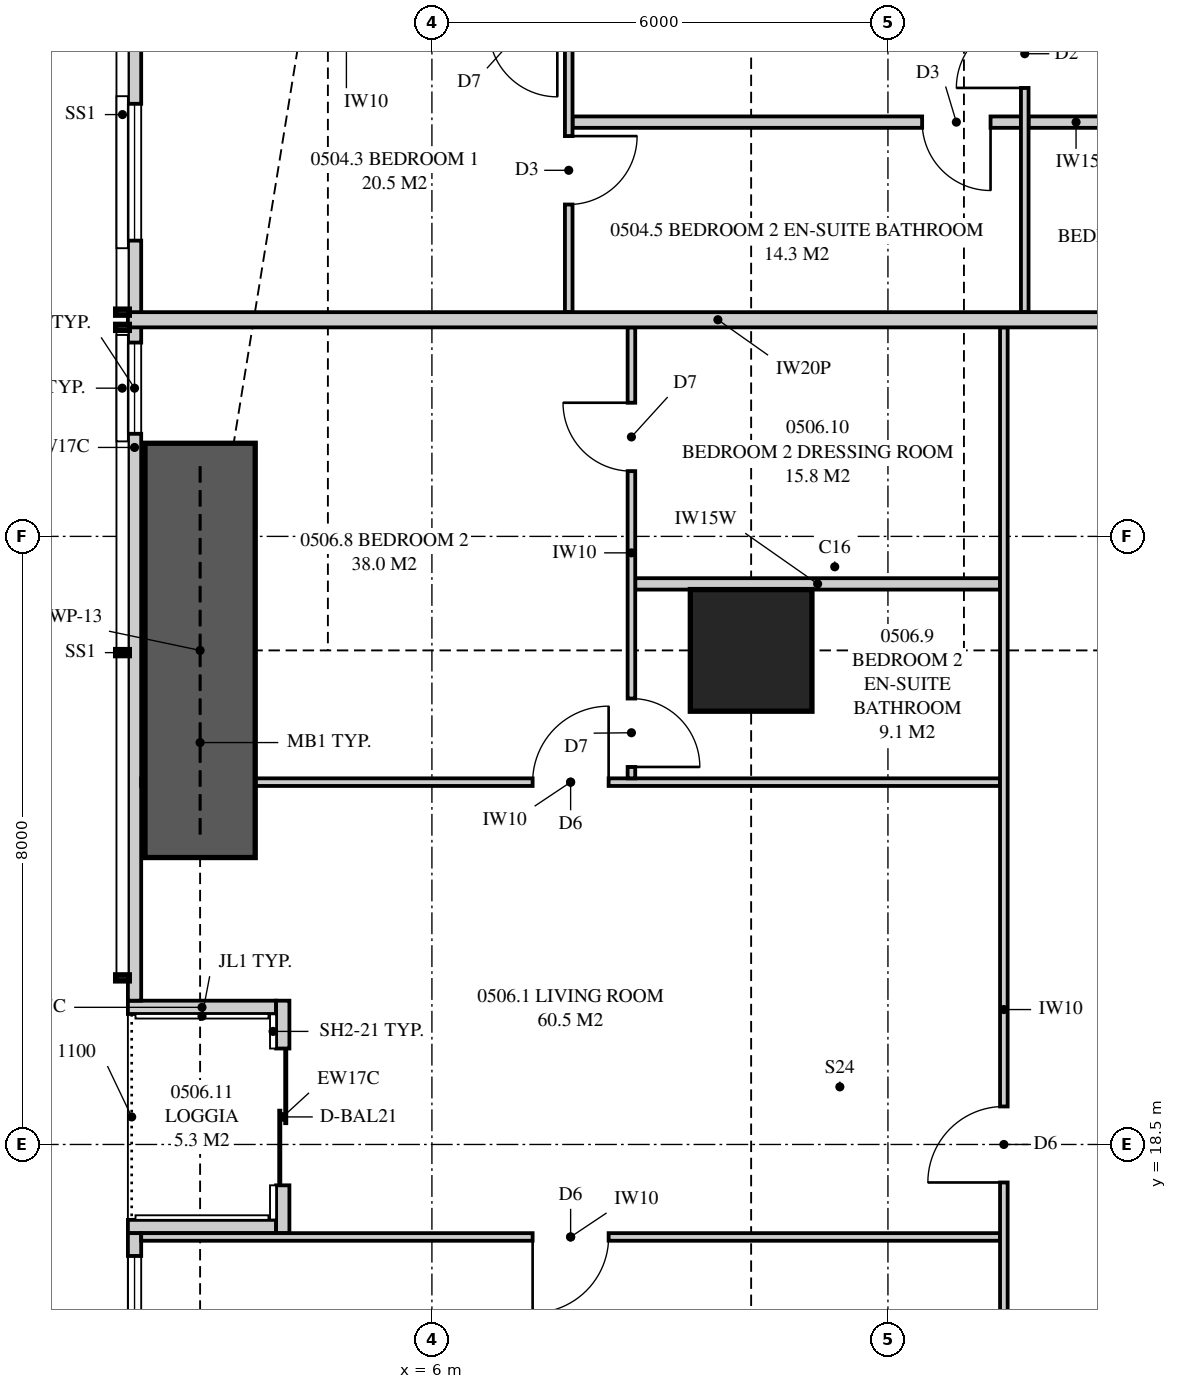
"""IFC4 building model, lengths in metres.
Left out: names, types, materials, properties, quantities, classifications, styles, units other than length and angle.
Written with IfcOpenShell. Run it as: python <this file> out.ifc"""

import sys

from ifc_helpers import new_model, si_unit, direction, frame, frame_2d, origin, origin_2d, place, context, subcontext, project, spatial, polyline, rectangle, outline, extrude, element, fill, save


model = new_model("IFC4")
c1 = context("Model", 3, precision=1e-05, world=origin(), true_north=direction((0.0, 1.0)))
c2 = subcontext(c1, "Body", "Model", "MODEL_VIEW")
j1 = project(units=[si_unit("LENGTHUNIT", "METRE"), si_unit("PLANEANGLEUNIT", "RADIAN")], contexts=[c1])
p1 = place(None, origin())
s1 = spatial("IfcSite", under=j1, at=p1, CompositionType="ELEMENT")
p2 = place(p1, origin())
s2 = spatial("IfcBuilding", under=s1, at=p2, CompositionType="ELEMENT")
p3 = place(p2, frame((0.0, 0.0, 24.35)))
s3 = spatial("IfcBuildingStorey", under=s2, at=p3, CompositionType="ELEMENT", Elevation=24.35)
p4 = place(p3, frame((10.2, 25.0, 0.0), z_axis=(0.0, 0.0, 1.0), x_axis=(1.0, 0.0, 0.0)))
e1 = element("IfcColumn", 1, at=p4, inside=s3, PredefinedType="COLUMN", context=c2, shape_type="SweptSolid", body=[
    extrude(rectangle(XDim=1.6, YDim=1.6, at=origin_2d()), origin(), (0.0, 0.0, 1.0), 3.35),
])
p5 = place(p3, frame((2.087, 34.949, 0.0), z_axis=(0.0, 0.0, 1.0), x_axis=(0.0, -1.0, 0.0)))
e2 = element("IfcWall", 2, at=p5, inside=s3, PredefinedType="SOLIDWALL", context=c2, shape_type="SweptSolid", body=[
    extrude(outline(polyline([(0.0, 0.0), (14.557, 0.0), (14.557, 2.15), (9.949, 2.15), (9.949, 3.11), (9.823, 3.11), (9.823, 2.15), (9.73, 2.15), (9.73, 3.11), (0.0, 3.11), (0.0, 0.0)])), frame((0.0, 0.087, 0.0), z_axis=(0.0, -1.0, 0.0), x_axis=(1.0, 0.0, 0.0)), (0.0, 0.0, 1.0), 0.175),
])
p6 = place(p5, frame((2.757, 0.0, 0.4)))
e3 = element("IfcOpeningElement", 3, at=p6, cuts=e2, PredefinedType="OPENING", context=c2, shape_type="SweptSolid", body=[
    extrude(rectangle(XDim=1.8, YDim=1.7, at=frame_2d((0.9, 0.85))), frame((0.0, 0.097, 0.0), z_axis=(0.0, -1.0, 0.0), x_axis=(1.0, 0.0, 0.0)), (0.0, 0.0, 1.0), 0.195),
])
p7 = place(p5, frame((5.899, 0.0, 0.4)))
e4 = element("IfcOpeningElement", 4, at=p7, cuts=e2, PredefinedType="OPENING", context=c2, shape_type="SweptSolid", body=[
    extrude(rectangle(XDim=1.2, YDim=1.7, at=frame_2d((0.6, 0.85))), frame((0.0, 0.097, 0.0), z_axis=(0.0, -1.0, 0.0), x_axis=(1.0, 0.0, 0.0)), (0.0, 0.0, 1.0), 0.195),
])
p8 = place(p3, frame((2.087, 17.333, 0.0), z_axis=(0.0, 0.0, 1.0), x_axis=(0.0, -1.0, 0.0)))
e5 = element("IfcWall", 5, at=p8, inside=s3, PredefinedType="SOLIDWALL", context=c2, shape_type="SweptSolid", body=[
    extrude(outline(polyline([(0.0, 0.0), (14.282, 0.0), (14.282, 3.11), (4.552, 3.11), (4.552, 2.15), (4.459, 2.15), (4.459, 3.11), (4.333, 3.11), (4.333, 2.15), (0.0, 2.15), (0.0, 0.0)])), frame((0.0, 0.087, 0.0), z_axis=(0.0, -1.0, 0.0), x_axis=(1.0, 0.0, 0.0)), (0.0, 0.0, 1.0), 0.175),
])
p9 = place(p8, frame((0.3, 0.0, 0.4)))
e6 = element("IfcOpeningElement", 6, at=p9, cuts=e5, PredefinedType="OPENING", context=c2, shape_type="SweptSolid", body=[
    extrude(rectangle(XDim=1.2, YDim=1.7, at=frame_2d((0.6, 0.85))), frame((0.0, 0.097, 0.0), z_axis=(0.0, -1.0, 0.0), x_axis=(1.0, 0.0, 0.0)), (0.0, 0.0, 1.0), 0.195),
])
p10 = place(p8, frame((7.158, 0.0, 0.4)))
e7 = element("IfcOpeningElement", 7, at=p10, cuts=e5, PredefinedType="OPENING", context=c2, shape_type="SweptSolid", body=[
    extrude(rectangle(XDim=1.8, YDim=1.7, at=frame_2d((0.9, 0.85))), frame((0.0, 0.097, 0.0), z_axis=(0.0, -1.0, 0.0), x_axis=(1.0, 0.0, 0.0)), (0.0, 0.0, 1.0), 0.195),
])
p11 = place(p8, frame((10.225, 0.0, 0.4)))
e8 = element("IfcOpeningElement", 8, at=p11, cuts=e5, PredefinedType="OPENING", context=c2, shape_type="SweptSolid", body=[
    extrude(rectangle(XDim=1.8, YDim=1.7, at=frame_2d((0.9, 0.85))), frame((0.0, 0.097, 0.0), z_axis=(0.0, -1.0, 0.0), x_axis=(1.0, 0.0, 0.0)), (0.0, 0.0, 1.0), 0.195),
])
p12 = place(p3, frame((4.038, 20.392, 0.0), z_axis=(0.0, 0.0, 1.0), x_axis=(0.0, -1.0, 0.0)))
e9 = element("IfcWall", 9, at=p12, inside=s3, PredefinedType="SOLIDWALL", context=c2, shape_type="SweptSolid", body=[
    extrude(rectangle(XDim=3.058, YDim=0.175, at=frame_2d((1.529, 0.0))), origin(), (0.0, 0.0, 1.0), 3.11),
])
p13 = place(p12, frame((0.629, 0.0, 0.0)))
e10 = element("IfcOpeningElement", 10, at=p13, cuts=e9, PredefinedType="OPENING", context=c2, shape_type="SweptSolid", body=[
    extrude(rectangle(XDim=1.8, YDim=2.1, at=frame_2d((0.9, 1.05))), frame((0.0, 0.097, 0.0), z_axis=(0.0, -1.0, 0.0), x_axis=(1.0, 0.0, 0.0)), (0.0, 0.0, 1.0), 0.195),
])
for number, where, z_axis, x_axis in (
    (11, (2.0, 20.304, 0.0), (0.0, 0.0, 1.0), (1.0, 0.0, 0.0)),
    (12, (2.0, 17.421, 0.0), (0.0, 0.0, 1.0), (1.0, 0.0, 0.0)),
):
    element("IfcWall", number, at=place(p3, frame(where, z_axis=z_axis, x_axis=x_axis)), inside=s3, PredefinedType="SOLIDWALL", context=c2, shape_type="SweptSolid", body=[
        extrude(outline(polyline([(0.0, 0.0), (1.95, 0.0), (1.95, 3.11), (1.75, 3.11), (1.75, 2.15), (0.15, 2.15), (0.15, 3.11), (0.0, 3.11), (0.0, 0.0)])), frame((0.0, 0.087, 0.0), z_axis=(0.0, -1.0, 0.0), x_axis=(1.0, 0.0, 0.0)), (0.0, 0.0, 1.0), 0.175),
    ])
p14 = place(p3, frame((7.8, 37.825, 0.0), z_axis=(0.0, 0.0, 1.0), x_axis=(0.0, -1.0, 0.0)))
e13 = element("IfcWall", 13, at=p14, inside=s3, PredefinedType="PARTITIONING", context=c2, shape_type="SweptSolid", body=[
    extrude(outline(polyline([(0.0, 0.0), (8.375, 0.0), (8.375, 3.11), (2.697, 3.11), (2.697, 2.15), (0.943, 2.15), (0.943, 3.11), (0.0, 3.11), (0.0, 0.0)])), frame((0.0, 0.05, 0.0), z_axis=(0.0, -1.0, 0.0), x_axis=(1.0, 0.0, 0.0)), (0.0, 0.0, 1.0), 0.1),
])
p15 = place(p14, frame((2.842, 0.0, 0.0)))
e14 = element("IfcOpeningElement", 14, at=p15, cuts=e13, PredefinedType="OPENING", context=c2, shape_type="SweptSolid", body=[
    extrude(rectangle(XDim=0.9, YDim=2.1, at=frame_2d((0.45, 1.05))), frame((0.0, 0.06, 0.0), z_axis=(0.0, -1.0, 0.0), x_axis=(1.0, 0.0, 0.0)), (0.0, 0.0, 1.0), 0.12),
])
p16 = place(p14, frame((6.059, 0.0, 0.0)))
e15 = element("IfcOpeningElement", 15, at=p16, cuts=e13, PredefinedType="OPENING", context=c2, shape_type="SweptSolid", body=[
    extrude(rectangle(XDim=0.9, YDim=2.1, at=frame_2d((0.45, 1.05))), frame((0.0, 0.06, 0.0), z_axis=(0.0, -1.0, 0.0), x_axis=(1.0, 0.0, 0.0)), (0.0, 0.0, 1.0), 0.12),
])
p17 = place(p3, frame((13.8, 37.825, 0.0), z_axis=(0.0, 0.0, 1.0), x_axis=(0.0, -1.0, 0.0)))
e16 = element("IfcWall", 16, at=p17, inside=s3, PredefinedType="PARTITIONING", context=c2, shape_type="SweptSolid", body=[
    extrude(outline(polyline([(1.635, 2.15), (0.0, 2.15), (0.0, 0.0), (8.375, 0.0), (8.375, 3.11), (1.635, 3.11), (1.635, 2.15)]), holes=[polyline([(1.021, 0.126), (0.529, 0.126), (0.529, 0.919), (1.021, 0.919), (1.021, 0.126)]), polyline([(1.021, 1.231), (0.529, 1.231), (0.529, 2.024), (1.021, 2.024), (1.021, 1.231)])]), frame((0.0, 0.05, 0.0), z_axis=(0.0, -1.0, 0.0), x_axis=(1.0, 0.0, 0.0)), (0.0, 0.0, 1.0), 0.1),
])
p18 = place(p17, frame((4.525, 0.0, 0.0)))
e17 = element("IfcOpeningElement", 17, at=p18, cuts=e16, PredefinedType="OPENING", context=c2, shape_type="SweptSolid", body=[
    extrude(rectangle(XDim=0.9, YDim=2.1, at=frame_2d((0.45, 1.05))), frame((0.0, 0.06, 0.0), z_axis=(0.0, -1.0, 0.0), x_axis=(1.0, 0.0, 0.0)), (0.0, 0.0, 1.0), 0.12),
])
p19 = place(p3, frame((7.85, 31.95, 0.0), z_axis=(0.0, 0.0, 1.0), x_axis=(1.0, 0.0, 0.0)))
e18 = element("IfcWall", 18, at=p19, inside=s3, PredefinedType="PLUMBINGWALL", context=c2, shape_type="SweptSolid", body=[
    extrude(outline(polyline([(0.0, 0.0), (5.9, 0.0), (5.9, 3.11), (5.462, 3.11), (5.462, 2.541), (4.838, 2.541), (4.838, 3.11), (3.635, 3.11), (3.635, 2.51), (1.065, 2.51), (1.065, 3.11), (0.0, 3.11), (0.0, 0.0)])), frame((0.0, 0.075, 0.0), z_axis=(0.0, -1.0, 0.0), x_axis=(1.0, 0.0, 0.0)), (0.0, 0.0, 1.0), 0.15),
])
p20 = place(p19, frame((4.6, 0.0, 0.0)))
e19 = element("IfcOpeningElement", 19, at=p20, cuts=e18, PredefinedType="OPENING", context=c2, shape_type="SweptSolid", body=[
    extrude(rectangle(XDim=0.9, YDim=2.1, at=frame_2d((0.45, 1.05))), frame((0.0, 0.085, 0.0), z_axis=(0.0, -1.0, 0.0), x_axis=(1.0, 0.0, 0.0)), (0.0, 0.0, 1.0), 0.17),
])
p21 = place(p3, frame((13.85, 31.95, 0.0), z_axis=(0.0, 0.0, 1.0), x_axis=(1.0, 0.0, 0.0)))
e20 = element("IfcWall", 20, at=p21, inside=s3, PredefinedType="PLUMBINGWALL", context=c2, shape_type="SweptSolid", body=[
    extrude(rectangle(XDim=4.2, YDim=0.15, at=frame_2d((2.1, 0.0))), origin(), (0.0, 0.0, 1.0), 3.11),
])
p22 = place(p21, frame((2.9, 0.0, 0.0)))
e21 = element("IfcOpeningElement", 21, at=p22, cuts=e20, PredefinedType="OPENING", context=c2, shape_type="SweptSolid", body=[
    extrude(rectangle(XDim=0.9, YDim=2.1, at=frame_2d((0.45, 1.05))), frame((0.0, 0.085, 0.0), z_axis=(0.0, -1.0, 0.0), x_axis=(1.0, 0.0, 0.0)), (0.0, 0.0, 1.0), 0.17),
])
p23 = place(p3, frame((2.0, 29.35, 0.0), z_axis=(0.0, 0.0, 1.0), x_axis=(1.0, 0.0, 0.0)))
e22 = element("IfcWall", 22, at=p23, inside=s3, PredefinedType="PARTITIONING", context=c2, shape_type="SweptSolid", body=[
    extrude(outline(polyline([(0.0, 0.0), (15.525, 0.0), (15.525, 3.11), (11.337, 3.11), (11.337, 2.541), (10.663, 2.541), (10.663, 3.11), (9.51, 3.11), (9.51, 2.51), (6.89, 2.51), (6.89, 3.11), (2.969, 3.11), (2.969, 2.541), (2.577, 2.541), (2.577, 2.15), (0.733, 2.15), (0.733, 3.11), (0.0, 3.11), (0.0, 0.0)])), frame((0.0, 0.1, 0.0), z_axis=(0.0, -1.0, 0.0), x_axis=(1.0, 0.0, 0.0)), (0.0, 0.0, 1.0), 0.2),
])
p24 = place(p3, frame((13.525, 11.3, 0.0), z_axis=(0.0, 0.0, 1.0), x_axis=(0.0, 1.0, 0.0)))
e23 = element("IfcWall", 23, at=p24, inside=s3, PredefinedType="PARTITIONING", context=c2, shape_type="SweptSolid", body=[
    extrude(outline(polyline([(0.0, 0.0), (17.95, 0.0), (17.95, 3.11), (13.987, 3.11), (13.987, 2.541), (13.413, 2.541), (13.413, 3.11), (1.987, 3.11), (1.987, 2.541), (1.413, 2.541), (1.413, 3.11), (0.0, 3.11), (0.0, 0.0)])), frame((0.0, 0.05, 0.0), z_axis=(0.0, -1.0, 0.0), x_axis=(1.0, 0.0, 0.0)), (0.0, 0.0, 1.0), 0.1),
])
p25 = place(p24, frame((6.7, 0.0, 0.0)))
e24 = element("IfcOpeningElement", 24, at=p25, cuts=e23, PredefinedType="OPENING", context=c2, shape_type="SweptSolid", body=[
    extrude(rectangle(XDim=1.0, YDim=2.1, at=frame_2d((0.5, 1.05))), frame((0.0, 0.06, 0.0), z_axis=(0.0, -1.0, 0.0), x_axis=(1.0, 0.0, 0.0)), (0.0, 0.0, 1.0), 0.12),
])
p26 = place(p3, frame((2.175, 17.283, 0.0), z_axis=(0.0, 0.0, 1.0), x_axis=(1.0, 0.0, 0.0)))
e25 = element("IfcWall", 25, at=p26, inside=s3, PredefinedType="PARTITIONING", context=c2, shape_type="SweptSolid", body=[
    extrude(outline(polyline([(0.0, 0.0), (11.3, 0.0), (11.3, 3.11), (9.285, 3.11), (9.285, 2.51), (6.765, 2.51), (6.765, 3.11), (1.635, 3.11), (1.635, 2.15), (0.0, 2.15), (0.0, 3.11), (0.0, 0.0)])), frame((0.0, 0.05, 0.0), z_axis=(0.0, -1.0, 0.0), x_axis=(1.0, 0.0, 0.0)), (0.0, 0.0, 1.0), 0.1),
])
p27 = place(p26, frame((5.15, 0.0, 0.0)))
e26 = element("IfcOpeningElement", 26, at=p27, cuts=e25, PredefinedType="OPENING", context=c2, shape_type="SweptSolid", body=[
    extrude(rectangle(XDim=1.0, YDim=2.1, at=frame_2d((0.5, 1.05))), frame((0.0, 0.06, 0.0), z_axis=(0.0, -1.0, 0.0), x_axis=(1.0, 0.0, 0.0)), (0.0, 0.0, 1.0), 0.12),
])
p28 = place(p3, frame((2.175, 23.267, 0.0), z_axis=(0.0, 0.0, 1.0), x_axis=(1.0, 0.0, 0.0)))
e27 = element("IfcWall", 27, at=p28, inside=s3, PredefinedType="PARTITIONING", context=c2, shape_type="SweptSolid", body=[
    extrude(outline(polyline([(0.529, 2.15), (0.0, 2.15), (0.0, 0.0), (0.529, 0.0), (0.529, 0.274), (1.021, 0.274), (1.021, 0.0), (11.3, 0.0), (11.3, 3.11), (9.285, 3.11), (9.285, 2.51), (6.765, 2.51), (6.765, 3.11), (1.635, 3.11), (1.635, 2.15), (1.021, 2.15), (1.021, 1.876), (0.529, 1.876), (0.529, 2.15)])), frame((0.0, 0.05, 0.0), z_axis=(0.0, -1.0, 0.0), x_axis=(1.0, 0.0, 0.0)), (0.0, 0.0, 1.0), 0.1),
])
p29 = place(p28, frame((5.15, 0.0, 0.0)))
e28 = element("IfcOpeningElement", 28, at=p29, cuts=e27, PredefinedType="OPENING", context=c2, shape_type="SweptSolid", body=[
    extrude(rectangle(XDim=1.0, YDim=2.1, at=frame_2d((0.5, 1.05))), frame((0.0, 0.06, 0.0), z_axis=(0.0, -1.0, 0.0), x_axis=(1.0, 0.0, 0.0)), (0.0, 0.0, 1.0), 0.12),
])
p30 = place(p3, frame((8.625, 23.317, 0.0), z_axis=(0.0, 0.0, 1.0), x_axis=(0.0, 1.0, 0.0)))
e29 = element("IfcWall", 29, at=p30, inside=s3, PredefinedType="PARTITIONING", context=c2, shape_type="SweptSolid", body=[
    extrude(outline(polyline([(0.0, 0.0), (5.933, 0.0), (5.933, 3.11), (1.971, 3.11), (1.971, 2.541), (1.396, 2.541), (1.396, 3.11), (0.0, 3.11), (0.0, 0.0)])), frame((0.0, 0.05, 0.0), z_axis=(0.0, -1.0, 0.0), x_axis=(1.0, 0.0, 0.0)), (0.0, 0.0, 1.0), 0.1),
])
p31 = place(p30, frame((0.15, 0.0, 0.0)))
e30 = element("IfcOpeningElement", 30, at=p31, cuts=e29, PredefinedType="OPENING", context=c2, shape_type="SweptSolid", body=[
    extrude(rectangle(XDim=0.9, YDim=2.1, at=frame_2d((0.45, 1.05))), frame((0.0, 0.06, 0.0), z_axis=(0.0, -1.0, 0.0), x_axis=(1.0, 0.0, 0.0)), (0.0, 0.0, 1.0), 0.12),
])
p32 = place(p30, frame((4.042, 0.0, 0.0)))
e31 = element("IfcOpeningElement", 31, at=p32, cuts=e29, PredefinedType="OPENING", context=c2, shape_type="SweptSolid", body=[
    extrude(rectangle(XDim=0.9, YDim=2.1, at=frame_2d((0.45, 1.05))), frame((0.0, 0.06, 0.0), z_axis=(0.0, -1.0, 0.0), x_axis=(1.0, 0.0, 0.0)), (0.0, 0.0, 1.0), 0.12),
])
p33 = place(p3, frame((8.675, 25.875, 0.0), z_axis=(0.0, 0.0, 1.0), x_axis=(1.0, 0.0, 0.0)))
e32 = element("IfcWall", 32, at=p33, inside=s3, PredefinedType="PLUMBINGWALL", context=c2, shape_type="SweptSolid", body=[
    extrude(outline(polyline([(0.0, 0.0), (4.8, 0.0), (4.8, 3.11), (4.637, 3.11), (4.637, 2.541), (4.013, 2.541), (4.013, 3.11), (2.81, 3.11), (2.81, 2.51), (0.24, 2.51), (0.24, 3.11), (0.0, 3.11), (0.0, 0.0)])), frame((0.0, 0.075, 0.0), z_axis=(0.0, -1.0, 0.0), x_axis=(1.0, 0.0, 0.0)), (0.0, 0.0, 1.0), 0.15),
])
p34 = place(p3, frame((2.95, 22.275, 0.0), z_axis=(0.0, 0.0, 1.0), x_axis=(0.0, 1.0, 0.0)))
e33 = element("IfcWall", 33, at=p34, inside=s3, PredefinedType="SHEAR", context=c2, shape_type="SweptSolid", body=[
    extrude(rectangle(XDim=5.45, YDim=1.45, at=frame_2d((2.725, 0.0))), origin(), (0.0, 0.0, 1.0), 3.35),
])
p35 = place(p6, origin())
e34 = element("IfcWindow", 34, at=p35, inside=s3, PartitioningType="SINGLE_PANEL", PredefinedType="WINDOW", context=c2, shape_type="SweptSolid", body=[
    extrude(rectangle(XDim=1.8, YDim=1.7, at=frame_2d((0.9, 0.85))), frame((0.0, 0.03, 0.0), z_axis=(0.0, -1.0, 0.0), x_axis=(1.0, 0.0, 0.0)), (0.0, 0.0, 1.0), 0.06),
])
fill(e3, e34)
p36 = place(p7, origin())
e35 = element("IfcWindow", 35, at=p36, inside=s3, PartitioningType="SINGLE_PANEL", PredefinedType="WINDOW", context=c2, shape_type="SweptSolid", body=[
    extrude(rectangle(XDim=1.2, YDim=1.7, at=frame_2d((0.6, 0.85))), frame((0.0, 0.03, 0.0), z_axis=(0.0, -1.0, 0.0), x_axis=(1.0, 0.0, 0.0)), (0.0, 0.0, 1.0), 0.06),
])
fill(e4, e35)
p37 = place(p13, origin())
e36 = element("IfcDoor", 36, at=p37, inside=s3, OperationType="SLIDING_TO_LEFT", PredefinedType="DOOR", context=c2, shape_type="SweptSolid", body=[
    extrude(rectangle(XDim=1.8, YDim=2.1, at=frame_2d((0.9, 1.05))), frame((0.0, 0.025, 0.0), z_axis=(0.0, -1.0, 0.0), x_axis=(1.0, 0.0, 0.0)), (0.0, 0.0, 1.0), 0.05),
])
fill(e10, e36)
p38 = place(p9, origin())
e37 = element("IfcWindow", 37, at=p38, inside=s3, PartitioningType="SINGLE_PANEL", PredefinedType="WINDOW", context=c2, shape_type="SweptSolid", body=[
    extrude(rectangle(XDim=1.2, YDim=1.7, at=frame_2d((0.6, 0.85))), frame((0.0, 0.03, 0.0), z_axis=(0.0, -1.0, 0.0), x_axis=(1.0, 0.0, 0.0)), (0.0, 0.0, 1.0), 0.06),
])
fill(e6, e37)
p39 = place(p18, frame((0.9, 0.0, 0.0), z_axis=(0.0, 0.0, 1.0), x_axis=(-1.0, 0.0, 0.0)))
e38 = element("IfcDoor", 38, at=p39, inside=s3, OperationType="SINGLE_SWING_LEFT", PredefinedType="DOOR", context=c2, shape_type="SweptSolid", body=[
    extrude(rectangle(XDim=0.9, YDim=2.1, at=frame_2d((0.45, 1.05))), frame((0.0, 0.025, 0.0), z_axis=(0.0, -1.0, 0.0), x_axis=(1.0, 0.0, 0.0)), (0.0, 0.0, 1.0), 0.05),
])
fill(e17, e38)
p40 = place(p20, frame((0.9, 0.0, 0.0), z_axis=(0.0, 0.0, 1.0), x_axis=(-1.0, 0.0, 0.0)))
e39 = element("IfcDoor", 39, at=p40, inside=s3, OperationType="SINGLE_SWING_LEFT", PredefinedType="DOOR", context=c2, shape_type="SweptSolid", body=[
    extrude(rectangle(XDim=0.9, YDim=2.1, at=frame_2d((0.45, 1.05))), frame((0.0, 0.025, 0.0), z_axis=(0.0, -1.0, 0.0), x_axis=(1.0, 0.0, 0.0)), (0.0, 0.0, 1.0), 0.05),
])
fill(e19, e39)
p41 = place(p16, origin())
e40 = element("IfcDoor", 40, at=p41, inside=s3, OperationType="SINGLE_SWING_LEFT", PredefinedType="DOOR", context=c2, shape_type="SweptSolid", body=[
    extrude(rectangle(XDim=0.9, YDim=2.1, at=frame_2d((0.45, 1.05))), frame((0.0, 0.025, 0.0), z_axis=(0.0, -1.0, 0.0), x_axis=(1.0, 0.0, 0.0)), (0.0, 0.0, 1.0), 0.05),
])
fill(e15, e40)
p42 = place(p25, origin())
e41 = element("IfcDoor", 41, at=p42, inside=s3, OperationType="SINGLE_SWING_LEFT", PredefinedType="DOOR", context=c2, shape_type="SweptSolid", body=[
    extrude(rectangle(XDim=1.0, YDim=2.1, at=frame_2d((0.5, 1.05))), frame((0.0, 0.025, 0.0), z_axis=(0.0, -1.0, 0.0), x_axis=(1.0, 0.0, 0.0)), (0.0, 0.0, 1.0), 0.05),
])
fill(e24, e41)
p43 = place(p27, frame((1.0, 0.0, 0.0), z_axis=(0.0, 0.0, 1.0), x_axis=(-1.0, 0.0, 0.0)))
e42 = element("IfcDoor", 42, at=p43, inside=s3, OperationType="SINGLE_SWING_RIGHT", PredefinedType="DOOR", context=c2, shape_type="SweptSolid", body=[
    extrude(rectangle(XDim=1.0, YDim=2.1, at=frame_2d((0.5, 1.05))), frame((0.0, 0.025, 0.0), z_axis=(0.0, -1.0, 0.0), x_axis=(1.0, 0.0, 0.0)), (0.0, 0.0, 1.0), 0.05),
])
fill(e26, e42)
p44 = place(p29, origin())
e43 = element("IfcDoor", 43, at=p44, inside=s3, OperationType="SINGLE_SWING_RIGHT", PredefinedType="DOOR", context=c2, shape_type="SweptSolid", body=[
    extrude(rectangle(XDim=1.0, YDim=2.1, at=frame_2d((0.5, 1.05))), frame((0.0, 0.025, 0.0), z_axis=(0.0, -1.0, 0.0), x_axis=(1.0, 0.0, 0.0)), (0.0, 0.0, 1.0), 0.05),
])
fill(e28, e43)
p45 = place(p31, frame((0.9, 0.0, 0.0), z_axis=(0.0, 0.0, 1.0), x_axis=(-1.0, 0.0, 0.0)))
e44 = element("IfcDoor", 44, at=p45, inside=s3, OperationType="SINGLE_SWING_RIGHT", PredefinedType="DOOR", context=c2, shape_type="SweptSolid", body=[
    extrude(rectangle(XDim=0.9, YDim=2.1, at=frame_2d((0.45, 1.05))), frame((0.0, 0.025, 0.0), z_axis=(0.0, -1.0, 0.0), x_axis=(1.0, 0.0, 0.0)), (0.0, 0.0, 1.0), 0.05),
])
fill(e30, e44)
p46 = place(p32, origin())
e45 = element("IfcDoor", 45, at=p46, inside=s3, OperationType="SINGLE_SWING_RIGHT", PredefinedType="DOOR", context=c2, shape_type="SweptSolid", body=[
    extrude(rectangle(XDim=0.9, YDim=2.1, at=frame_2d((0.45, 1.05))), frame((0.0, 0.025, 0.0), z_axis=(0.0, -1.0, 0.0), x_axis=(1.0, 0.0, 0.0)), (0.0, 0.0, 1.0), 0.05),
])
fill(e31, e45)
save(model, sys.argv[1])
